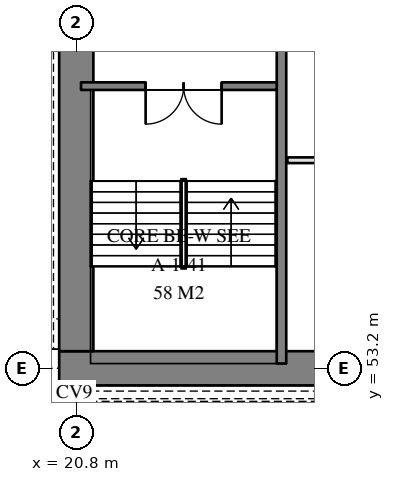
"""IFC4 building model, lengths in metres.
Left out: names, types, materials, properties, quantities, classifications, styles, units other than length and angle.
Written with IfcOpenShell. Run it as: python <this file> out.ifc"""

import sys

from ifc_helpers import new_model, si_unit, direction, frame, frame_2d, origin, place, context, subcontext, project, spatial, rectangle, extrude, element, fill, save


model = new_model("IFC4")
c1 = context("Model", 3, precision=1e-05, world=origin(), true_north=direction((0.0, 1.0)))
c2 = subcontext(c1, "Body", "Model", "MODEL_VIEW")
j1 = project(units=[si_unit("LENGTHUNIT", "METRE"), si_unit("PLANEANGLEUNIT", "RADIAN")], contexts=[c1])
p1 = place(None, origin())
s1 = spatial("IfcSite", under=j1, at=p1, CompositionType="ELEMENT")
p2 = place(p1, origin())
s2 = spatial("IfcBuilding", under=s1, at=p2, CompositionType="ELEMENT")
p3 = place(p2, frame((0.0, 0.0, -11.4)))
s3 = spatial("IfcBuildingStorey", under=s2, at=p3, CompositionType="ELEMENT", Elevation=-11.4)
p4 = place(p3, frame((20.35, 53.2, 0.0), z_axis=(0.0, 0.0, 1.0), x_axis=(1.0, 0.0, 0.0)))
e1 = element("IfcWall", 1, at=p4, inside=s3, PredefinedType="SOLIDWALL", context=c2, shape_type="SweptSolid", body=[
    extrude(rectangle(XDim=162.9, YDim=0.9, at=frame_2d((81.45, 0.0))), origin(), (0.0, 0.0, 1.0), 6.0),
])
p5 = place(p3, frame((20.8, 74.35, 0.0), z_axis=(0.0, 0.0, 1.0), x_axis=(0.0, -1.0, 0.0)))
e2 = element("IfcWall", 2, at=p5, inside=s3, PredefinedType="SOLIDWALL", context=c2, shape_type="SweptSolid", body=[
    extrude(rectangle(XDim=20.7, YDim=0.9, at=frame_2d((10.35, 0.0))), origin(), (0.0, 0.0, 1.0), 6.0),
])
p6 = place(p3, frame((26.2, 53.325, 0.0), z_axis=(0.0, 0.0, 1.0), x_axis=(0.0, 1.0, 0.0)))
e3 = element("IfcWall", 3, at=p6, inside=s3, PredefinedType="SOLIDWALL", context=c2, shape_type="SweptSolid", body=[
    extrude(rectangle(XDim=10.55, YDim=0.25, at=frame_2d((5.275, 0.0))), origin(), (0.0, 0.0, 1.0), 6.0),
])
p7 = place(p3, frame((26.075, 60.625, 0.0), z_axis=(0.0, 0.0, 1.0), x_axis=(-1.0, 0.0, 0.0)))
e4 = element("IfcWall", 4, at=p7, inside=s3, PredefinedType="SOLIDWALL", context=c2, shape_type="SweptSolid", body=[
    extrude(rectangle(XDim=5.15, YDim=0.2, at=frame_2d((2.575, 0.0))), origin(), (0.0, 0.0, 1.0), 5.6),
])
p8 = place(p7, frame((1.45, 0.0, 0.0)))
e5 = element("IfcOpeningElement", 5, at=p8, cuts=e4, PredefinedType="OPENING", context=c2, shape_type="SweptSolid", body=[
    extrude(rectangle(XDim=2.0, YDim=2.1, at=frame_2d((1.0, 1.05))), frame((0.0, 0.11, 0.0), z_axis=(0.0, -1.0, 0.0), x_axis=(1.0, 0.0, 0.0)), (0.0, 0.0, 1.0), 0.22),
])
p9 = place(p3, frame((26.355, 58.675, 0.0), z_axis=(0.0, 0.0, 1.0), x_axis=(1.0, 0.0, 0.0)))
e6 = element("IfcWall", 6, at=p9, inside=s3, PredefinedType="PARTITIONING", context=c2, shape_type="SweptSolid", body=[
    extrude(rectangle(XDim=10.645, YDim=0.15, at=frame_2d((5.323, 0.0))), origin(), (0.0, 0.0, 1.0), 4.7),
])
p10 = place(p8, frame((2.0, 0.0, 0.0), z_axis=(0.0, 0.0, 1.0), x_axis=(-1.0, 0.0, 0.0)))
e7 = element("IfcDoor", 7, at=p10, inside=s3, OperationType="DOUBLE_DOOR_DOUBLE_SWING", PredefinedType="DOOR", context=c2, shape_type="SweptSolid", body=[
    extrude(rectangle(XDim=2.0, YDim=2.1, at=frame_2d((1.0, 1.05))), frame((0.0, 0.025, 0.0), z_axis=(0.0, -1.0, 0.0), x_axis=(1.0, 0.0, 0.0)), (0.0, 0.0, 1.0), 0.05),
])
fill(e5, e7)
save(model, sys.argv[1])
